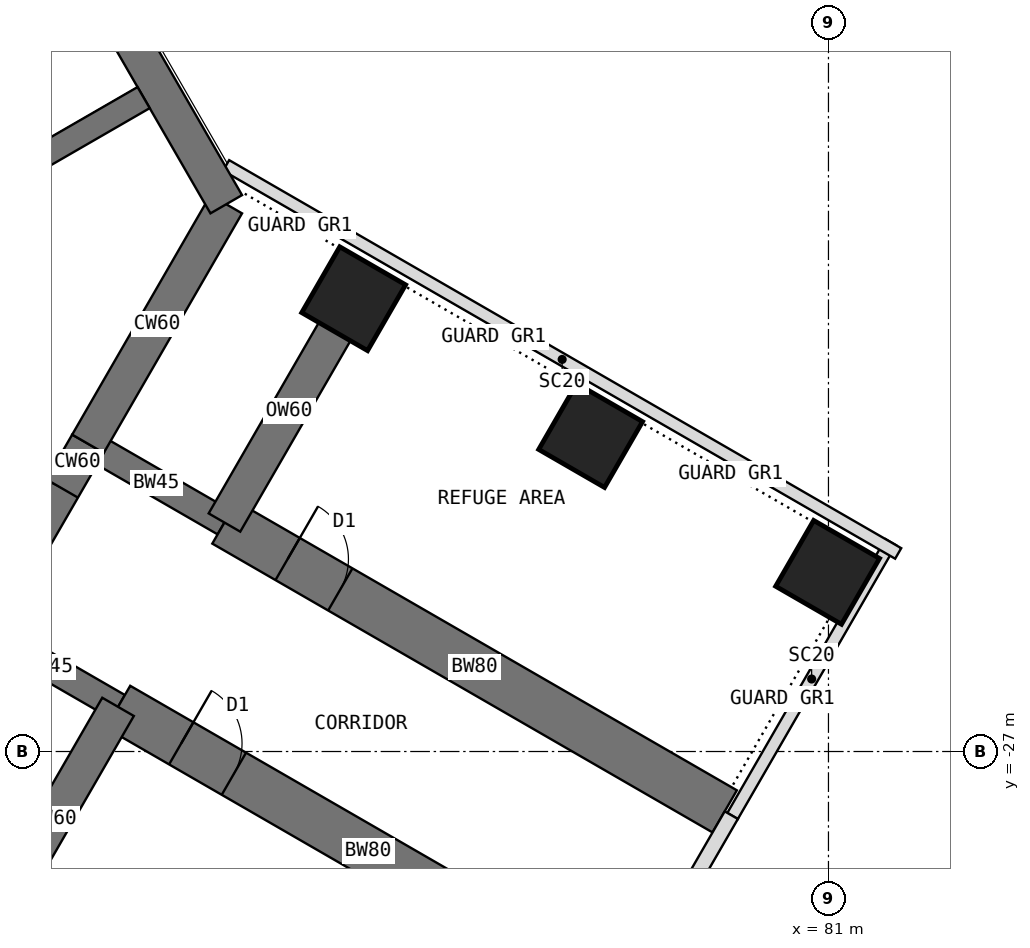
"""IFC4 building model, lengths in metres.
Left out: names, types, materials, properties, quantities, classifications, styles, units other than length and angle.
Written with IfcOpenShell. Run it as: python <this file> out.ifc"""

import sys

from ifc_helpers import new_model, si_unit, direction, frame, frame_2d, origin, origin_2d, place, context, subcontext, project, spatial, rectangle, extrude, element, fill, save


model = new_model("IFC4")
c1 = context("Model", 3, precision=1e-05, world=origin(), true_north=direction((0.0, 1.0)))
c2 = subcontext(c1, "Body", "Model", "MODEL_VIEW")
j1 = project(units=[si_unit("LENGTHUNIT", "METRE"), si_unit("PLANEANGLEUNIT", "RADIAN")], contexts=[c1])
p1 = place(None, origin())
s1 = spatial("IfcSite", under=j1, at=p1, CompositionType="ELEMENT")
p2 = place(p1, origin())
s2 = spatial("IfcBuilding", under=s1, at=p2, CompositionType="ELEMENT")
p3 = place(p2, frame((0.0, 0.0, 165.5)))
s3 = spatial("IfcBuildingStorey", under=s2, at=p3, CompositionType="ELEMENT", Elevation=165.5)
p4 = place(p3, frame((67.072, -24.97, 0.0), z_axis=(0.0, 0.0, 1.0), x_axis=(0.500010275428, 0.866019471182, 0.0)))
e1 = element("IfcWall", 1, at=p4, inside=s3, PredefinedType="SHEAR", context=c2, shape_type="SweptSolid", body=[
    extrude(rectangle(XDim=3.5, YDim=0.6, at=frame_2d((1.75, 0.0))), origin(), (0.0, 0.0, 1.0), 5.0),
])
p5 = place(p4, frame((0.85, 0.0, 0.0)))
e2 = element("IfcOpeningElement", 2, at=p5, cuts=e1, PredefinedType="OPENING", context=c2, shape_type="SweptSolid", body=[
    extrude(rectangle(XDim=1.8, YDim=2.1, at=frame_2d((0.9, 1.05))), frame((0.0, 0.31, 0.0), z_axis=(0.0, -1.0, 0.0), x_axis=(1.0, 0.0, 0.0)), (0.0, 0.0, 1.0), 0.62),
])
p6 = place(p3, frame((68.822, -21.939, 0.0), z_axis=(0.0, 0.0, 1.0), x_axis=(0.500024481964, 0.866011268655, 0.0)))
e3 = element("IfcWall", 3, at=p6, inside=s3, PredefinedType="SHEAR", context=c2, shape_type="SweptSolid", body=[
    extrude(rectangle(XDim=4.548, YDim=0.6, at=frame_2d((2.274, 0.0))), origin(), (0.0, 0.0, 1.0), 5.0),
])
p7 = place(p3, frame((71.096, -18.0, 0.0), z_axis=(0.0, 0.0, 1.0), x_axis=(-0.500005998175, 0.866021940709, 0.0)))
e4 = element("IfcWall", 4, at=p7, inside=s3, PredefinedType="SHEAR", context=c2, shape_type="SweptSolid", body=[
    extrude(rectangle(XDim=12.596, YDim=0.6, at=frame_2d((6.298, 0.0))), origin(), (0.0, 0.0, 1.0), 5.0),
])
p8 = place(p3, frame((68.822, -21.939, 0.0), z_axis=(0.0, 0.0, 1.0), x_axis=(0.866072649678, -0.499918158782, 0.0)))
e5 = element("IfcWall", 5, at=p8, inside=s3, PredefinedType="SHEAR", context=c2, shape_type="SweptSolid", body=[
    extrude(rectangle(XDim=2.592, YDim=0.45, at=frame_2d((1.296, 0.0))), origin(), (0.0, 0.0, 1.0), 5.0),
])
p9 = place(p3, frame((71.066, -23.234, 0.0), z_axis=(0.0, 0.0, 1.0), x_axis=(0.86602681393, -0.499997557548, 0.0)))
e6 = element("IfcWall", 6, at=p9, inside=s3, PredefinedType="SHEAR", context=c2, shape_type="SweptSolid", body=[
    extrude(rectangle(XDim=9.5, YDim=0.8, at=frame_2d((4.75, 0.0))), origin(), (0.0, 0.0, 1.0), 5.0),
])
p10 = place(p9, frame((1.2, 0.0, 0.0)))
e7 = element("IfcOpeningElement", 7, at=p10, cuts=e6, PredefinedType="OPENING", context=c2, shape_type="SweptSolid", body=[
    extrude(rectangle(XDim=1.0, YDim=2.1, at=frame_2d((0.5, 1.05))), frame((0.0, 0.41, 0.0), z_axis=(0.0, -1.0, 0.0), x_axis=(1.0, 0.0, 0.0)), (0.0, 0.0, 1.0), 0.82),
])
p11 = place(p3, frame((67.072, -24.97, 0.0), z_axis=(0.0, 0.0, 1.0), x_axis=(0.866031863473, -0.499988811324, 0.0)))
e8 = element("IfcWall", 8, at=p11, inside=s3, PredefinedType="SHEAR", context=c2, shape_type="SweptSolid", body=[
    extrude(rectangle(XDim=2.592, YDim=0.45, at=frame_2d((1.296, 0.0))), origin(), (0.0, 0.0, 1.0), 5.0),
])
p12 = place(p3, frame((69.316, -26.266, 0.0), z_axis=(0.0, 0.0, 1.0), x_axis=(0.86602681393, -0.499997557548, 0.0)))
e9 = element("IfcWall", 9, at=p12, inside=s3, PredefinedType="SHEAR", context=c2, shape_type="SweptSolid", body=[
    extrude(rectangle(XDim=9.5, YDim=0.8, at=frame_2d((4.75, 0.0))), origin(), (0.0, 0.0, 1.0), 5.0),
])
p13 = place(p12, frame((1.2, 0.0, 0.0)))
e10 = element("IfcOpeningElement", 10, at=p13, cuts=e9, PredefinedType="OPENING", context=c2, shape_type="SweptSolid", body=[
    extrude(rectangle(XDim=1.0, YDim=2.1, at=frame_2d((0.5, 1.05))), frame((0.0, 0.41, 0.0), z_axis=(0.0, -1.0, 0.0), x_axis=(1.0, 0.0, 0.0)), (0.0, 0.0, 1.0), 0.82),
])
for number, where, z_axis, x_axis in (
    (11, (73.191, -19.554, 0.0), (0.0, 0.0, 1.0), (0.5, 0.866, 0.0)),
    (12, (77.088, -21.804, 0.0), (0.0, 0.0, 1.0), (0.5, 0.866, 0.0)),
    (13, (80.986, -24.054, 0.0), (0.0, 0.0, 1.0), (0.5, 0.866, 0.0)),
):
    element("IfcColumn", number, at=place(p3, frame(where, z_axis=z_axis, x_axis=x_axis)), inside=s3, PredefinedType="COLUMN", context=c2, shape_type="SweptSolid", body=[
        extrude(rectangle(XDim=1.25, YDim=1.25, at=origin_2d()), origin(), (0.0, 0.0, 1.0), 5.0),
    ])
for number, where, z_axis, x_axis in (
    (14, (71.066, -23.234, 0.0), (0.0, 0.0, 1.0), (0.5, 0.866, 0.0)),
    (15, (69.316, -26.266, 0.0), (0.0, 0.0, 1.0), (-0.5, -0.866, 0.0)),
):
    element("IfcWall", number, at=place(p3, frame(where, z_axis=z_axis, x_axis=x_axis)), inside=s3, PredefinedType="SHEAR", context=c2, shape_type="SweptSolid", body=[
        extrude(rectangle(XDim=4.25, YDim=0.6, at=frame_2d((2.125, 0.0))), origin(), (0.0, 0.0, 1.0), 5.0),
    ])
p14 = place(p3, frame((71.094, -17.361, 0.0), z_axis=(0.0, 0.0, 1.0), x_axis=(0.866028540889, -0.499994566336, 0.0)))
e16 = element("IfcWall", 16, at=p14, inside=s3, PredefinedType="USERDEFINED", context=c2, shape_type="SweptSolid", body=[
    extrude(rectangle(XDim=12.763, YDim=0.2, at=frame_2d((6.381, 0.0))), origin(), (0.0, 0.0, 1.0), 4.8),
])
p15 = place(p3, frame((77.652, -31.078, 0.0), z_axis=(0.0, 0.0, 1.0), x_axis=(0.499980071345, 0.866036909293, 0.0)))
e17 = element("IfcWall", 17, at=p15, inside=s3, PredefinedType="STANDARD", context=c2, shape_type="SweptSolid", body=[
    extrude(rectangle(XDim=3.5, YDim=0.25, at=frame_2d((1.75, 0.0))), origin(), (0.0, 0.0, 1.0), 4.8),
])
p16 = place(p3, frame((79.424, -28.06, 0.0), z_axis=(0.0, 0.0, 1.0), x_axis=(0.499971721724, 0.866041729639, 0.0)))
e18 = element("IfcWall", 18, at=p16, inside=s3, PredefinedType="USERDEFINED", context=c2, shape_type="SweptSolid", body=[
    extrude(rectangle(XDim=5.2, YDim=0.2, at=frame_2d((2.6, 0.0))), origin(), (0.0, 0.0, 1.0), 4.8),
])
p17 = place(p3, frame((64.62, -19.201, 0.0), z_axis=(0.0, 0.0, 1.0), x_axis=(0.866027317282, 0.49999668571, 0.0)))
e19 = element("IfcWall", 19, at=p17, inside=s3, PredefinedType="SHEAR", context=c2, shape_type="SweptSolid", body=[
    extrude(rectangle(XDim=5.908, YDim=0.4, at=frame_2d((2.954, 0.0))), origin(), (0.0, 0.0, 1.0), 5.0),
])
p18 = place(p5, origin())
e20 = element("IfcDoor", 20, at=p18, inside=s3, OperationType="DOUBLE_DOOR_DOUBLE_SWING", PredefinedType="DOOR", context=c2, shape_type="SweptSolid", body=[
    extrude(rectangle(XDim=1.72, YDim=2.06, at=frame_2d((0.9, 1.03))), frame((0.0, 0.025, 0.0), z_axis=(0.0, -1.0, 0.0), x_axis=(1.0, 0.0, 0.0)), (0.0, 0.0, 1.0), 0.05),
    extrude(rectangle(XDim=0.04, YDim=2.1, at=frame_2d((0.02, 1.05))), frame((0.0, 0.3, 0.0), z_axis=(0.0, -1.0, 0.0), x_axis=(1.0, 0.0, 0.0)), (0.0, 0.0, 1.0), 0.6),
    extrude(rectangle(XDim=0.04, YDim=2.1, at=frame_2d((1.78, 1.05))), frame((0.0, 0.3, 0.0), z_axis=(0.0, -1.0, 0.0), x_axis=(1.0, 0.0, 0.0)), (0.0, 0.0, 1.0), 0.6),
    extrude(rectangle(XDim=1.72, YDim=0.04, at=frame_2d((0.9, 2.08))), frame((0.0, 0.3, 0.0), z_axis=(0.0, -1.0, 0.0), x_axis=(1.0, 0.0, 0.0)), (0.0, 0.0, 1.0), 0.6),
])
fill(e2, e20)
p19 = place(p10, origin())
e21 = element("IfcDoor", 21, at=p19, inside=s3, OperationType="SINGLE_SWING_LEFT", PredefinedType="DOOR", context=c2, shape_type="SweptSolid", body=[
    extrude(rectangle(XDim=0.92, YDim=2.06, at=frame_2d((0.5, 1.03))), frame((0.0, 0.025, 0.0), z_axis=(0.0, -1.0, 0.0), x_axis=(1.0, 0.0, 0.0)), (0.0, 0.0, 1.0), 0.05),
    extrude(rectangle(XDim=0.04, YDim=2.1, at=frame_2d((0.02, 1.05))), frame((0.0, 0.4, 0.0), z_axis=(0.0, -1.0, 0.0), x_axis=(1.0, 0.0, 0.0)), (0.0, 0.0, 1.0), 0.8),
    extrude(rectangle(XDim=0.04, YDim=2.1, at=frame_2d((0.98, 1.05))), frame((0.0, 0.4, 0.0), z_axis=(0.0, -1.0, 0.0), x_axis=(1.0, 0.0, 0.0)), (0.0, 0.0, 1.0), 0.8),
    extrude(rectangle(XDim=0.92, YDim=0.04, at=frame_2d((0.5, 2.08))), frame((0.0, 0.4, 0.0), z_axis=(0.0, -1.0, 0.0), x_axis=(1.0, 0.0, 0.0)), (0.0, 0.0, 1.0), 0.8),
])
fill(e7, e21)
p20 = place(p13, origin())
e22 = element("IfcDoor", 22, at=p20, inside=s3, OperationType="SINGLE_SWING_LEFT", PredefinedType="DOOR", context=c2, shape_type="SweptSolid", body=[
    extrude(rectangle(XDim=0.92, YDim=2.06, at=frame_2d((0.5, 1.03))), frame((0.0, 0.025, 0.0), z_axis=(0.0, -1.0, 0.0), x_axis=(1.0, 0.0, 0.0)), (0.0, 0.0, 1.0), 0.05),
    extrude(rectangle(XDim=0.04, YDim=2.1, at=frame_2d((0.02, 1.05))), frame((0.0, 0.4, 0.0), z_axis=(0.0, -1.0, 0.0), x_axis=(1.0, 0.0, 0.0)), (0.0, 0.0, 1.0), 0.8),
    extrude(rectangle(XDim=0.04, YDim=2.1, at=frame_2d((0.98, 1.05))), frame((0.0, 0.4, 0.0), z_axis=(0.0, -1.0, 0.0), x_axis=(1.0, 0.0, 0.0)), (0.0, 0.0, 1.0), 0.8),
    extrude(rectangle(XDim=0.92, YDim=0.04, at=frame_2d((0.5, 2.08))), frame((0.0, 0.4, 0.0), z_axis=(0.0, -1.0, 0.0), x_axis=(1.0, 0.0, 0.0)), (0.0, 0.0, 1.0), 0.8),
])
fill(e10, e22)
save(model, sys.argv[1])
